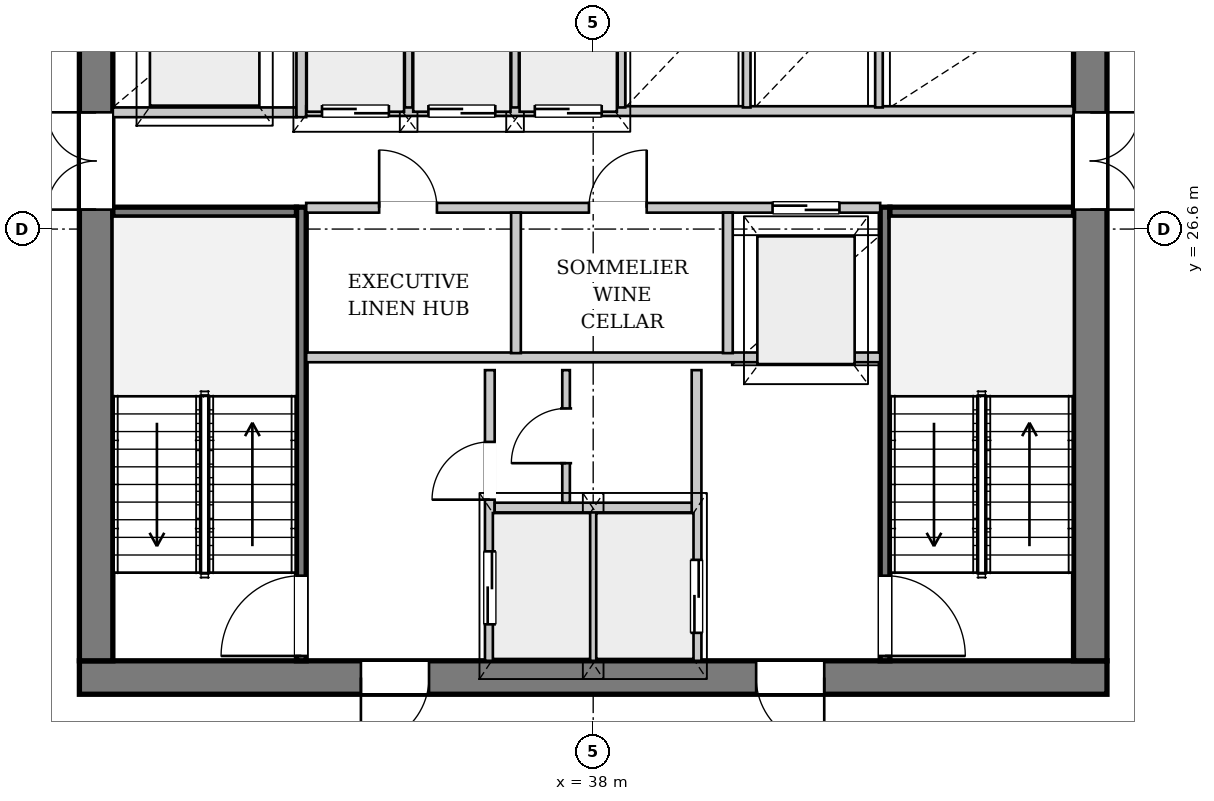
"""IFC4 building model, lengths in metres.
Left out: names, types, materials, properties, quantities, classifications, styles, units other than length and angle.
Written with IfcOpenShell. Run it as: python <this file> out.ifc"""

import sys

from ifc_helpers import new_model, si_unit, direction, frame, frame_2d, origin, place, context, subcontext, project, spatial, rectangle, extrude, source, transform, mapped, element, fill, save


model = new_model("IFC4")
c1 = context("Model", 3, precision=1e-05, world=origin(), true_north=direction((0.0, 1.0)))
c2 = subcontext(c1, "Body", "Model", "MODEL_VIEW")
j1 = project(units=[si_unit("LENGTHUNIT", "METRE"), si_unit("PLANEANGLEUNIT", "RADIAN")], contexts=[c1])
p1 = place(None, origin())
s1 = spatial("IfcSite", under=j1, at=p1, CompositionType="ELEMENT")
p2 = place(p1, origin())
s2 = spatial("IfcBuilding", under=s1, at=p2, CompositionType="ELEMENT")
p3 = place(p2, frame((0.0, 0.0, 192.75)))
s3 = spatial("IfcBuildingStorey", under=s2, at=p3, CompositionType="ELEMENT", Elevation=192.75)
p4 = place(p3, frame((53.026, 22.104, 0.0), z_axis=(0.0, 0.0, 1.0), x_axis=(-0.558570859801, -0.829456806941, 0.0)))
e1 = element("IfcWall", 1, at=p4, inside=s3, PredefinedType="SOLIDWALL", context=c2, shape_type="SweptSolid", body=[
    extrude(rectangle(XDim=23.224, YDim=0.32, at=frame_2d((11.612, 0.0))), origin(), (0.0, 0.0, 1.0), 2.722),
])
p5 = place(p4, frame((6.682, 0.0, 0.0)))
e2 = element("IfcOpeningElement", 2, at=p5, cuts=e1, PredefinedType="OPENING", context=c2, shape_type="SweptSolid", body=[
    extrude(rectangle(XDim=1.5, YDim=2.3, at=frame_2d((0.75, 1.15))), frame((0.0, 0.17, 0.0), z_axis=(0.0, -1.0, 0.0), x_axis=(1.0, 0.0, 0.0)), (0.0, 0.0, 1.0), 0.34),
])
p6 = place(p4, frame((15.886, 0.0, 0.252)))
e3 = element("IfcOpeningElement", 3, at=p6, cuts=e1, PredefinedType="OPENING", context=c2, shape_type="SweptSolid", body=[
    extrude(rectangle(XDim=2.6, YDim=2.35, at=frame_2d((1.3, 1.175))), frame((0.0, 0.17, 0.0), z_axis=(0.0, -1.0, 0.0), x_axis=(1.0, 0.0, 0.0)), (0.0, 0.0, 1.0), 0.34),
])
p7 = place(p3, frame((46.45, 19.225, 0.0), z_axis=(0.0, 0.0, 1.0), x_axis=(-1.0, 0.0, 0.0)))
e4 = element("IfcWall", 4, at=p7, inside=s3, PredefinedType="SHEAR", context=c2, shape_type="SweptSolid", body=[
    extrude(rectangle(XDim=16.9, YDim=0.55, at=frame_2d((8.45, 0.0))), origin(), (0.0, 0.0, 1.0), 3.33),
])
p8 = place(p7, frame((4.65, 0.0, 0.0)))
e5 = element("IfcOpeningElement", 5, at=p8, cuts=e4, PredefinedType="OPENING", context=c2, shape_type="SweptSolid", body=[
    extrude(rectangle(XDim=1.12, YDim=2.25, at=frame_2d((0.56, 1.125))), frame((0.0, 0.285, 0.0), z_axis=(0.0, -1.0, 0.0), x_axis=(1.0, 0.0, 0.0)), (0.0, 0.0, 1.0), 0.57),
])
p9 = place(p7, frame((11.15, 0.0, 0.0)))
e6 = element("IfcOpeningElement", 6, at=p9, cuts=e4, PredefinedType="OPENING", context=c2, shape_type="SweptSolid", body=[
    extrude(rectangle(XDim=1.12, YDim=2.25, at=frame_2d((0.56, 1.125))), frame((0.0, 0.285, 0.0), z_axis=(0.0, -1.0, 0.0), x_axis=(1.0, 0.0, 0.0)), (0.0, 0.0, 1.0), 0.57),
])
p10 = place(p3, frame((29.825, 19.5, 0.0), z_axis=(0.0, 0.0, 1.0), x_axis=(0.0, 1.0, 0.0)))
e7 = element("IfcWall", 7, at=p10, inside=s3, PredefinedType="SHEAR", context=c2, shape_type="SweptSolid", body=[
    extrude(rectangle(XDim=14.2, YDim=0.55, at=frame_2d((7.1, 0.0))), origin(), (0.0, 0.0, 1.0), 3.33),
])
p11 = place(p10, frame((7.42, 0.0, 0.0)))
e8 = element("IfcOpeningElement", 8, at=p11, cuts=e7, PredefinedType="OPENING", context=c2, shape_type="SweptSolid", body=[
    extrude(rectangle(XDim=1.6, YDim=2.2, at=frame_2d((0.8, 1.1))), frame((0.0, 0.285, 0.0), z_axis=(0.0, -1.0, 0.0), x_axis=(1.0, 0.0, 0.0)), (0.0, 0.0, 1.0), 0.57),
])
p12 = place(p3, frame((46.175, 33.7, 0.0), z_axis=(0.0, 0.0, 1.0), x_axis=(0.0, -1.0, 0.0)))
e9 = element("IfcWall", 9, at=p12, inside=s3, PredefinedType="SHEAR", context=c2, shape_type="SweptSolid", body=[
    extrude(rectangle(XDim=14.2, YDim=0.55, at=frame_2d((7.1, 0.0))), origin(), (0.0, 0.0, 1.0), 3.33),
])
p13 = place(p12, frame((5.18, 0.0, 0.0)))
e10 = element("IfcOpeningElement", 10, at=p13, cuts=e9, PredefinedType="OPENING", context=c2, shape_type="SweptSolid", body=[
    extrude(rectangle(XDim=1.6, YDim=2.2, at=frame_2d((0.8, 1.1))), frame((0.0, 0.285, 0.0), z_axis=(0.0, -1.0, 0.0), x_axis=(1.0, 0.0, 0.0)), (0.0, 0.0, 1.0), 0.57),
])
p14 = place(p12, frame((2.05, 0.0, 0.0)))
e11 = element("IfcOpeningElement", 11, at=p14, cuts=e9, PredefinedType="OPENING", context=c2, shape_type="SweptSolid", body=[
    extrude(rectangle(XDim=0.95, YDim=2.1, at=frame_2d((0.475, 1.05))), frame((0.0, 0.285, 0.0), z_axis=(0.0, -1.0, 0.0), x_axis=(1.0, 0.0, 0.0)), (0.0, 0.0, 1.0), 0.57),
])
p15 = place(p3, frame((33.2, 19.5, 0.0), z_axis=(0.0, 0.0, 1.0), x_axis=(0.0, 1.0, 0.0)))
e12 = element("IfcWall", 12, at=p15, inside=s3, PredefinedType="PARTITIONING", context=c2, shape_type="SweptSolid", body=[
    extrude(rectangle(XDim=7.46, YDim=0.16, at=frame_2d((3.73, 0.0))), origin(), (0.0, 0.0, 1.0), 3.33),
])
p16 = place(p15, frame((0.08, 0.0, 0.0)))
e13 = element("IfcOpeningElement", 13, at=p16, cuts=e12, PredefinedType="OPENING", context=c2, shape_type="SweptSolid", body=[
    extrude(rectangle(XDim=1.32, YDim=2.2, at=frame_2d((0.66, 1.1))), frame((0.0, 0.09, 0.0), z_axis=(0.0, -1.0, 0.0), x_axis=(1.0, 0.0, 0.0)), (0.0, 0.0, 1.0), 0.18),
])
p17 = place(p3, frame((30.1, 26.88, 0.0), z_axis=(0.0, 0.0, 1.0), x_axis=(1.0, 0.0, 0.0)))
e14 = element("IfcWall", 14, at=p17, inside=s3, PredefinedType="PARTITIONING", context=c2, shape_type="SweptSolid", body=[
    extrude(rectangle(XDim=3.02, YDim=0.16, at=frame_2d((1.51, 0.0))), origin(), (0.0, 0.0, 1.0), 3.33),
])
p18 = place(p3, frame((42.8, 26.96, 0.0), z_axis=(0.0, 0.0, 1.0), x_axis=(0.0, -1.0, 0.0)))
e15 = element("IfcWall", 15, at=p18, inside=s3, PredefinedType="PARTITIONING", context=c2, shape_type="SweptSolid", body=[
    extrude(rectangle(XDim=7.46, YDim=0.16, at=frame_2d((3.73, 0.0))), origin(), (0.0, 0.0, 1.0), 3.33),
])
p19 = place(p18, frame((6.06, 0.0, 0.0)))
e16 = element("IfcOpeningElement", 16, at=p19, cuts=e15, PredefinedType="OPENING", context=c2, shape_type="SweptSolid", body=[
    extrude(rectangle(XDim=1.32, YDim=2.2, at=frame_2d((0.66, 1.1))), frame((0.0, 0.09, 0.0), z_axis=(0.0, -1.0, 0.0), x_axis=(1.0, 0.0, 0.0)), (0.0, 0.0, 1.0), 0.18),
])
p20 = place(p3, frame((42.88, 26.88, 0.0), z_axis=(0.0, 0.0, 1.0), x_axis=(1.0, 0.0, 0.0)))
e17 = element("IfcWall", 17, at=p20, inside=s3, PredefinedType="PARTITIONING", context=c2, shape_type="SweptSolid", body=[
    extrude(rectangle(XDim=3.02, YDim=0.16, at=frame_2d((1.51, 0.0))), origin(), (0.0, 0.0, 1.0), 3.33),
])
p21 = place(p3, frame((36.3, 19.5, 0.0), z_axis=(0.0, 0.0, 1.0), x_axis=(0.0, 1.0, 0.0)))
e18 = element("IfcWall", 18, at=p21, inside=s3, PredefinedType="PARTITIONING", context=c2, shape_type="SweptSolid", body=[
    extrude(rectangle(XDim=4.78, YDim=0.16, at=frame_2d((2.39, 0.0))), origin(), (0.0, 0.0, 1.0), 3.33),
])
p22 = place(p21, frame((0.6, 0.0, 0.0)))
e19 = element("IfcOpeningElement", 19, at=p22, cuts=e18, PredefinedType="OPENING", context=c2, shape_type="SweptSolid", body=[
    extrude(rectangle(XDim=1.2, YDim=2.2, at=frame_2d((0.6, 1.1))), frame((0.0, 0.09, 0.0), z_axis=(0.0, -1.0, 0.0), x_axis=(1.0, 0.0, 0.0)), (0.0, 0.0, 1.0), 0.18),
])
p23 = place(p21, frame((2.65, 0.0, 0.0)))
e20 = element("IfcOpeningElement", 20, at=p23, cuts=e18, PredefinedType="OPENING", context=c2, shape_type="SweptSolid", body=[
    extrude(rectangle(XDim=0.95, YDim=2.1, at=frame_2d((0.475, 1.05))), frame((0.0, 0.09, 0.0), z_axis=(0.0, -1.0, 0.0), x_axis=(1.0, 0.0, 0.0)), (0.0, 0.0, 1.0), 0.18),
])
p24 = place(p3, frame((39.7, 24.28, 0.0), z_axis=(0.0, 0.0, 1.0), x_axis=(0.0, -1.0, 0.0)))
e21 = element("IfcWall", 21, at=p24, inside=s3, PredefinedType="PARTITIONING", context=c2, shape_type="SweptSolid", body=[
    extrude(rectangle(XDim=4.78, YDim=0.16, at=frame_2d((2.39, 0.0))), origin(), (0.0, 0.0, 1.0), 3.33),
])
p25 = place(p24, frame((3.12, 0.0, 0.0)))
e22 = element("IfcOpeningElement", 22, at=p25, cuts=e21, PredefinedType="OPENING", context=c2, shape_type="SweptSolid", body=[
    extrude(rectangle(XDim=1.2, YDim=2.2, at=frame_2d((0.6, 1.1))), frame((0.0, 0.09, 0.0), z_axis=(0.0, -1.0, 0.0), x_axis=(1.0, 0.0, 0.0)), (0.0, 0.0, 1.0), 0.18),
])
p26 = place(p3, frame((38.0, 19.5, 0.0), z_axis=(0.0, 0.0, 1.0), x_axis=(0.0, 1.0, 0.0)))
e23 = element("IfcWall", 23, at=p26, inside=s3, PredefinedType="PARTITIONING", context=c2, shape_type="SweptSolid", body=[
    extrude(rectangle(XDim=2.46, YDim=0.125, at=frame_2d((1.23, 0.0))), origin(), (0.0, 0.0, 1.0), 3.33),
])
p27 = place(p3, frame((36.38, 22.02, 0.0), z_axis=(0.0, 0.0, 1.0), x_axis=(1.0, 0.0, 0.0)))
e24 = element("IfcWall", 24, at=p27, inside=s3, PredefinedType="PARTITIONING", context=c2, shape_type="SweptSolid", body=[
    extrude(rectangle(XDim=3.24, YDim=0.16, at=frame_2d((1.62, 0.0))), origin(), (0.0, 0.0, 1.0), 3.33),
])
p28 = place(p3, frame((33.28, 24.49, 0.0), z_axis=(0.0, 0.0, 1.0), x_axis=(1.0, 0.0, 0.0)))
e25 = element("IfcWall", 25, at=p28, inside=s3, PredefinedType="PARTITIONING", context=c2, shape_type="SweptSolid", body=[
    extrude(rectangle(XDim=9.44, YDim=0.16, at=frame_2d((4.72, 0.0))), origin(), (0.0, 0.0, 1.0), 3.33),
])
p29 = place(p3, frame((37.554, 22.1, 0.0), z_axis=(0.0, 0.0, 1.0), x_axis=(0.0, 1.0, 0.0)))
e26 = element("IfcWall", 26, at=p29, inside=s3, PredefinedType="PARTITIONING", context=c2, shape_type="SweptSolid", body=[
    extrude(rectangle(XDim=2.18, YDim=0.125, at=frame_2d((1.09, 0.0))), origin(), (0.0, 0.0, 1.0), 3.33),
])
p30 = place(p29, frame((0.65, 0.0, 0.0)))
e27 = element("IfcOpeningElement", 27, at=p30, cuts=e26, PredefinedType="OPENING", context=c2, shape_type="SweptSolid", body=[
    extrude(rectangle(XDim=0.9, YDim=2.1, at=frame_2d((0.45, 1.05))), frame((0.0, 0.073, 0.0), z_axis=(0.0, -1.0, 0.0), x_axis=(1.0, 0.0, 0.0)), (0.0, 0.0, 1.0), 0.145),
])
p31 = place(p3, frame((30.1, 28.52, 0.0), z_axis=(0.0, 0.0, 1.0), x_axis=(1.0, 0.0, 0.0)))
e28 = element("IfcWall", 28, at=p31, inside=s3, PredefinedType="PARTITIONING", context=c2, shape_type="SweptSolid", body=[
    extrude(rectangle(XDim=3.02, YDim=0.16, at=frame_2d((1.51, 0.0))), origin(), (0.0, 0.0, 1.0), 3.33),
])
p32 = place(p3, frame((33.2, 28.44, 0.0), z_axis=(0.0, 0.0, 1.0), x_axis=(0.0, 1.0, 0.0)))
e29 = element("IfcWall", 29, at=p32, inside=s3, PredefinedType="PARTITIONING", context=c2, shape_type="SweptSolid", body=[
    extrude(rectangle(XDim=5.26, YDim=0.16, at=frame_2d((2.63, 0.0))), origin(), (0.0, 0.0, 1.0), 3.33),
])
p33 = place(p3, frame((33.28, 26.95, 0.0), z_axis=(0.0, 0.0, 1.0), x_axis=(1.0, 0.0, 0.0)))
e30 = element("IfcWall", 30, at=p33, inside=s3, PredefinedType="PARTITIONING", context=c2, shape_type="SweptSolid", body=[
    extrude(rectangle(XDim=9.44, YDim=0.16, at=frame_2d((4.72, 0.0))), origin(), (0.0, 0.0, 1.0), 3.33),
])
p34 = place(p33, frame((1.2, 0.0, 0.0)))
e31 = element("IfcOpeningElement", 31, at=p34, cuts=e30, PredefinedType="OPENING", context=c2, shape_type="SweptSolid", body=[
    extrude(rectangle(XDim=0.95, YDim=2.1, at=frame_2d((0.475, 1.05))), frame((0.0, 0.09, 0.0), z_axis=(0.0, -1.0, 0.0), x_axis=(1.0, 0.0, 0.0)), (0.0, 0.0, 1.0), 0.18),
])
p35 = place(p33, frame((4.65, 0.0, 0.0)))
e32 = element("IfcOpeningElement", 32, at=p35, cuts=e30, PredefinedType="OPENING", context=c2, shape_type="SweptSolid", body=[
    extrude(rectangle(XDim=0.95, YDim=2.1, at=frame_2d((0.475, 1.05))), frame((0.0, 0.09, 0.0), z_axis=(0.0, -1.0, 0.0), x_axis=(1.0, 0.0, 0.0)), (0.0, 0.0, 1.0), 0.18),
])
p36 = place(p33, frame((7.67, 0.0, 0.0)))
e33 = element("IfcOpeningElement", 33, at=p36, cuts=e30, PredefinedType="OPENING", context=c2, shape_type="SweptSolid", body=[
    extrude(rectangle(XDim=1.1, YDim=2.2, at=frame_2d((0.55, 1.1))), frame((0.0, 0.09, 0.0), z_axis=(0.0, -1.0, 0.0), x_axis=(1.0, 0.0, 0.0)), (0.0, 0.0, 1.0), 0.18),
])
for number, where, z_axis, x_axis in (
    (34, (36.73, 24.56, 0.0), (0.0, 0.0, 1.0), (0.0, 1.0, 0.0)),
    (35, (40.215, 24.56, 0.0), (0.0, 0.0, 1.0), (0.0, 1.0, 0.0)),
):
    element("IfcWall", number, at=place(p3, frame(where, z_axis=z_axis, x_axis=x_axis)), inside=s3, PredefinedType="PARTITIONING", context=c2, shape_type="SweptSolid", body=[
        extrude(rectangle(XDim=2.31, YDim=0.16, at=frame_2d((1.155, 0.0))), origin(), (0.0, 0.0, 1.0), 3.33),
    ])
p37 = place(p3, frame((33.28, 28.54, 0.0), z_axis=(0.0, 0.0, 1.0), x_axis=(1.0, 0.0, 0.0)))
e36 = element("IfcWall", 36, at=p37, inside=s3, PredefinedType="PARTITIONING", context=c2, shape_type="SweptSolid", body=[
    extrude(rectangle(XDim=12.62, YDim=0.16, at=frame_2d((6.31, 0.0))), origin(), (0.0, 0.0, 1.0), 3.33),
])
p38 = place(p37, frame((0.26, 0.0, 0.0)))
e37 = element("IfcOpeningElement", 37, at=p38, cuts=e36, PredefinedType="OPENING", context=c2, shape_type="SweptSolid", body=[
    extrude(rectangle(XDim=1.1, YDim=2.2, at=frame_2d((0.55, 1.1))), frame((0.0, 0.09, 0.0), z_axis=(0.0, -1.0, 0.0), x_axis=(1.0, 0.0, 0.0)), (0.0, 0.0, 1.0), 0.18),
])
p39 = place(p37, frame((2.01, 0.0, 0.0)))
e38 = element("IfcOpeningElement", 38, at=p39, cuts=e36, PredefinedType="OPENING", context=c2, shape_type="SweptSolid", body=[
    extrude(rectangle(XDim=1.1, YDim=2.2, at=frame_2d((0.55, 1.1))), frame((0.0, 0.09, 0.0), z_axis=(0.0, -1.0, 0.0), x_axis=(1.0, 0.0, 0.0)), (0.0, 0.0, 1.0), 0.18),
])
p40 = place(p37, frame((3.76, 0.0, 0.0)))
e39 = element("IfcOpeningElement", 39, at=p40, cuts=e36, PredefinedType="OPENING", context=c2, shape_type="SweptSolid", body=[
    extrude(rectangle(XDim=1.1, YDim=2.2, at=frame_2d((0.55, 1.1))), frame((0.0, 0.09, 0.0), z_axis=(0.0, -1.0, 0.0), x_axis=(1.0, 0.0, 0.0)), (0.0, 0.0, 1.0), 0.18),
])
for number, where, z_axis, x_axis in (
    (40, (34.965, 28.6, 0.0), (0.0, 0.0, 1.0), (0.0, 1.0, 0.0)),
    (41, (36.715, 28.6, 0.0), (0.0, 0.0, 1.0), (0.0, 1.0, 0.0)),
    (42, (38.465, 28.6, 0.0), (0.0, 0.0, 1.0), (0.0, 1.0, 0.0)),
    (43, (40.525, 28.6, 0.0), (0.0, 0.0, 1.0), (0.0, 1.0, 0.0)),
    (44, (42.7, 28.6, 0.0), (0.0, 0.0, 1.0), (0.0, 1.0, 0.0)),
):
    element("IfcWall", number, at=place(p3, frame(where, z_axis=z_axis, x_axis=x_axis)), inside=s3, PredefinedType="PARTITIONING", context=c2, shape_type="SweptSolid", body=[
        extrude(rectangle(XDim=1.92, YDim=0.125, at=frame_2d((0.96, 0.0))), origin(), (0.0, 0.0, 1.0), 3.33),
    ])
m1 = source(origin(), c2, "Body", "SweptSolid", [
    extrude(rectangle(XDim=1.12, YDim=2.25, at=frame_2d((0.56, 1.125))), frame((0.0, 0.025, 0.0), z_axis=(0.0, -1.0, 0.0), x_axis=(1.0, 0.0, 0.0)), (0.0, 0.0, 1.0), 0.05),
])
p41 = place(p8, origin())
e45 = element("IfcDoor", 45, at=p41, inside=s3, OperationType="SINGLE_SWING_LEFT", PredefinedType="DOOR", context=c2, shape_type="MappedRepresentation", body=[
    mapped(m1, transform((0.0, 0.0, 0.0), x_axis=(1.0, 0.0, 0.0), y_axis=(0.0, 1.0, 0.0), z_axis=(0.0, 0.0, 1.0), scale=1.0)),
])
fill(e5, e45)
p42 = place(p9, origin())
e46 = element("IfcDoor", 46, at=p42, inside=s3, OperationType="SINGLE_SWING_RIGHT", PredefinedType="DOOR", context=c2, shape_type="MappedRepresentation", body=[
    mapped(m1, transform((0.0, 0.0, 0.0), x_axis=(1.0, 0.0, 0.0), y_axis=(0.0, 1.0, 0.0), z_axis=(0.0, 0.0, 1.0), scale=1.0)),
])
fill(e6, e46)
m2 = source(origin(), c2, "Body", "SweptSolid", [
    extrude(rectangle(XDim=1.6, YDim=2.2, at=frame_2d((0.8, 1.1))), frame((0.0, 0.025, 0.0), z_axis=(0.0, -1.0, 0.0), x_axis=(1.0, 0.0, 0.0)), (0.0, 0.0, 1.0), 0.05),
])
p43 = place(p11, origin())
e47 = element("IfcDoor", 47, at=p43, inside=s3, OperationType="DOUBLE_DOOR_SINGLE_SWING", PredefinedType="DOOR", context=c2, shape_type="MappedRepresentation", body=[
    mapped(m2, transform((0.0, 0.0, 0.0), x_axis=(1.0, 0.0, 0.0), y_axis=(0.0, 1.0, 0.0), z_axis=(0.0, 0.0, 1.0), scale=1.0)),
])
fill(e8, e47)
p44 = place(p13, origin())
e48 = element("IfcDoor", 48, at=p44, inside=s3, OperationType="DOUBLE_DOOR_SINGLE_SWING", PredefinedType="DOOR", context=c2, shape_type="MappedRepresentation", body=[
    mapped(m2, transform((0.0, 0.0, 0.0), x_axis=(1.0, 0.0, 0.0), y_axis=(0.0, 1.0, 0.0), z_axis=(0.0, 0.0, 1.0), scale=1.0)),
])
fill(e10, e48)
m3 = source(origin(), c2, "Body", "SweptSolid", [
    extrude(rectangle(XDim=1.32, YDim=2.2, at=frame_2d((0.66, 1.1))), frame((0.0, 0.025, 0.0), z_axis=(0.0, -1.0, 0.0), x_axis=(1.0, 0.0, 0.0)), (0.0, 0.0, 1.0), 0.05),
])
p45 = place(p16, origin())
e49 = element("IfcDoor", 49, at=p45, inside=s3, OperationType="SINGLE_SWING_LEFT", PredefinedType="DOOR", context=c2, shape_type="MappedRepresentation", body=[
    mapped(m3, transform((0.0, 0.0, 0.0), x_axis=(1.0, 0.0, 0.0), y_axis=(0.0, 1.0, 0.0), z_axis=(0.0, 0.0, 1.0), scale=1.0)),
])
fill(e13, e49)
p46 = place(p19, origin())
e50 = element("IfcDoor", 50, at=p46, inside=s3, OperationType="SINGLE_SWING_RIGHT", PredefinedType="DOOR", context=c2, shape_type="MappedRepresentation", body=[
    mapped(m3, transform((0.0, 0.0, 0.0), x_axis=(1.0, 0.0, 0.0), y_axis=(0.0, 1.0, 0.0), z_axis=(0.0, 0.0, 1.0), scale=1.0)),
])
fill(e16, e50)
m4 = source(origin(), c2, "Body", "SweptSolid", [
    extrude(rectangle(XDim=1.2, YDim=2.2, at=frame_2d((0.6, 1.1))), frame((0.0, 0.025, 0.0), z_axis=(0.0, -1.0, 0.0), x_axis=(1.0, 0.0, 0.0)), (0.0, 0.0, 1.0), 0.05),
])
p47 = place(p22, origin())
e51 = element("IfcDoor", 51, at=p47, inside=s3, OperationType="DOUBLE_DOOR_SLIDING", PredefinedType="DOOR", context=c2, shape_type="MappedRepresentation", body=[
    mapped(m4, transform((0.0, 0.0, 0.0), x_axis=(1.0, 0.0, 0.0), y_axis=(0.0, 1.0, 0.0), z_axis=(0.0, 0.0, 1.0), scale=1.0)),
])
fill(e19, e51)
m5 = source(origin(), c2, "Body", "SweptSolid", [
    extrude(rectangle(XDim=0.95, YDim=2.1, at=frame_2d((0.475, 1.05))), frame((0.0, 0.025, 0.0), z_axis=(0.0, -1.0, 0.0), x_axis=(1.0, 0.0, 0.0)), (0.0, 0.0, 1.0), 0.05),
])
p48 = place(p23, origin())
e52 = element("IfcDoor", 52, at=p48, inside=s3, OperationType="SINGLE_SWING_LEFT", PredefinedType="DOOR", context=c2, shape_type="MappedRepresentation", body=[
    mapped(m5, transform((0.0, 0.0, 0.0), x_axis=(1.0, 0.0, 0.0), y_axis=(0.0, 1.0, 0.0), z_axis=(0.0, 0.0, 1.0), scale=1.0)),
])
fill(e20, e52)
m6 = source(origin(), c2, "Body", "SweptSolid", [
    extrude(rectangle(XDim=0.9, YDim=2.1, at=frame_2d((0.45, 1.05))), frame((0.0, 0.025, 0.0), z_axis=(0.0, -1.0, 0.0), x_axis=(1.0, 0.0, 0.0)), (0.0, 0.0, 1.0), 0.05),
])
p49 = place(p30, origin())
e53 = element("IfcDoor", 53, at=p49, inside=s3, OperationType="SINGLE_SWING_LEFT", PredefinedType="DOOR", context=c2, shape_type="MappedRepresentation", body=[
    mapped(m6, transform((0.0, 0.0, 0.0), x_axis=(1.0, 0.0, 0.0), y_axis=(0.0, 1.0, 0.0), z_axis=(0.0, 0.0, 1.0), scale=1.0)),
])
fill(e27, e53)
p50 = place(p25, origin())
e54 = element("IfcDoor", 54, at=p50, inside=s3, OperationType="DOUBLE_DOOR_SLIDING", PredefinedType="DOOR", context=c2, shape_type="MappedRepresentation", body=[
    mapped(m4, transform((0.0, 0.0, 0.0), x_axis=(1.0, 0.0, 0.0), y_axis=(0.0, 1.0, 0.0), z_axis=(0.0, 0.0, 1.0), scale=1.0)),
])
fill(e22, e54)
p51 = place(p34, origin())
e55 = element("IfcDoor", 55, at=p51, inside=s3, OperationType="SINGLE_SWING_LEFT", PredefinedType="DOOR", context=c2, shape_type="MappedRepresentation", body=[
    mapped(m5, transform((0.0, 0.0, 0.0), x_axis=(1.0, 0.0, 0.0), y_axis=(0.0, 1.0, 0.0), z_axis=(0.0, 0.0, 1.0), scale=1.0)),
])
fill(e31, e55)
p52 = place(p35, origin())
e56 = element("IfcDoor", 56, at=p52, inside=s3, OperationType="SINGLE_SWING_RIGHT", PredefinedType="DOOR", context=c2, shape_type="MappedRepresentation", body=[
    mapped(m5, transform((0.0, 0.0, 0.0), x_axis=(1.0, 0.0, 0.0), y_axis=(0.0, 1.0, 0.0), z_axis=(0.0, 0.0, 1.0), scale=1.0)),
])
fill(e32, e56)
m7 = source(origin(), c2, "Body", "SweptSolid", [
    extrude(rectangle(XDim=1.1, YDim=2.2, at=frame_2d((0.55, 1.1))), frame((0.0, 0.025, 0.0), z_axis=(0.0, -1.0, 0.0), x_axis=(1.0, 0.0, 0.0)), (0.0, 0.0, 1.0), 0.05),
])
p53 = place(p36, origin())
e57 = element("IfcDoor", 57, at=p53, inside=s3, OperationType="DOUBLE_DOOR_SLIDING", PredefinedType="DOOR", context=c2, shape_type="MappedRepresentation", body=[
    mapped(m7, transform((0.0, 0.0, 0.0), x_axis=(1.0, 0.0, 0.0), y_axis=(0.0, 1.0, 0.0), z_axis=(0.0, 0.0, 1.0), scale=1.0)),
])
fill(e33, e57)
p54 = place(p38, origin())
e58 = element("IfcDoor", 58, at=p54, inside=s3, OperationType="DOUBLE_DOOR_SLIDING", PredefinedType="DOOR", context=c2, shape_type="MappedRepresentation", body=[
    mapped(m7, transform((0.0, 0.0, 0.0), x_axis=(1.0, 0.0, 0.0), y_axis=(0.0, 1.0, 0.0), z_axis=(0.0, 0.0, 1.0), scale=1.0)),
])
fill(e37, e58)
p55 = place(p39, origin())
e59 = element("IfcDoor", 59, at=p55, inside=s3, OperationType="DOUBLE_DOOR_SLIDING", PredefinedType="DOOR", context=c2, shape_type="MappedRepresentation", body=[
    mapped(m7, transform((0.0, 0.0, 0.0), x_axis=(1.0, 0.0, 0.0), y_axis=(0.0, 1.0, 0.0), z_axis=(0.0, 0.0, 1.0), scale=1.0)),
])
fill(e38, e59)
p56 = place(p40, origin())
e60 = element("IfcDoor", 60, at=p56, inside=s3, OperationType="DOUBLE_DOOR_SLIDING", PredefinedType="DOOR", context=c2, shape_type="MappedRepresentation", body=[
    mapped(m7, transform((0.0, 0.0, 0.0), x_axis=(1.0, 0.0, 0.0), y_axis=(0.0, 1.0, 0.0), z_axis=(0.0, 0.0, 1.0), scale=1.0)),
])
fill(e39, e60)
save(model, sys.argv[1])
